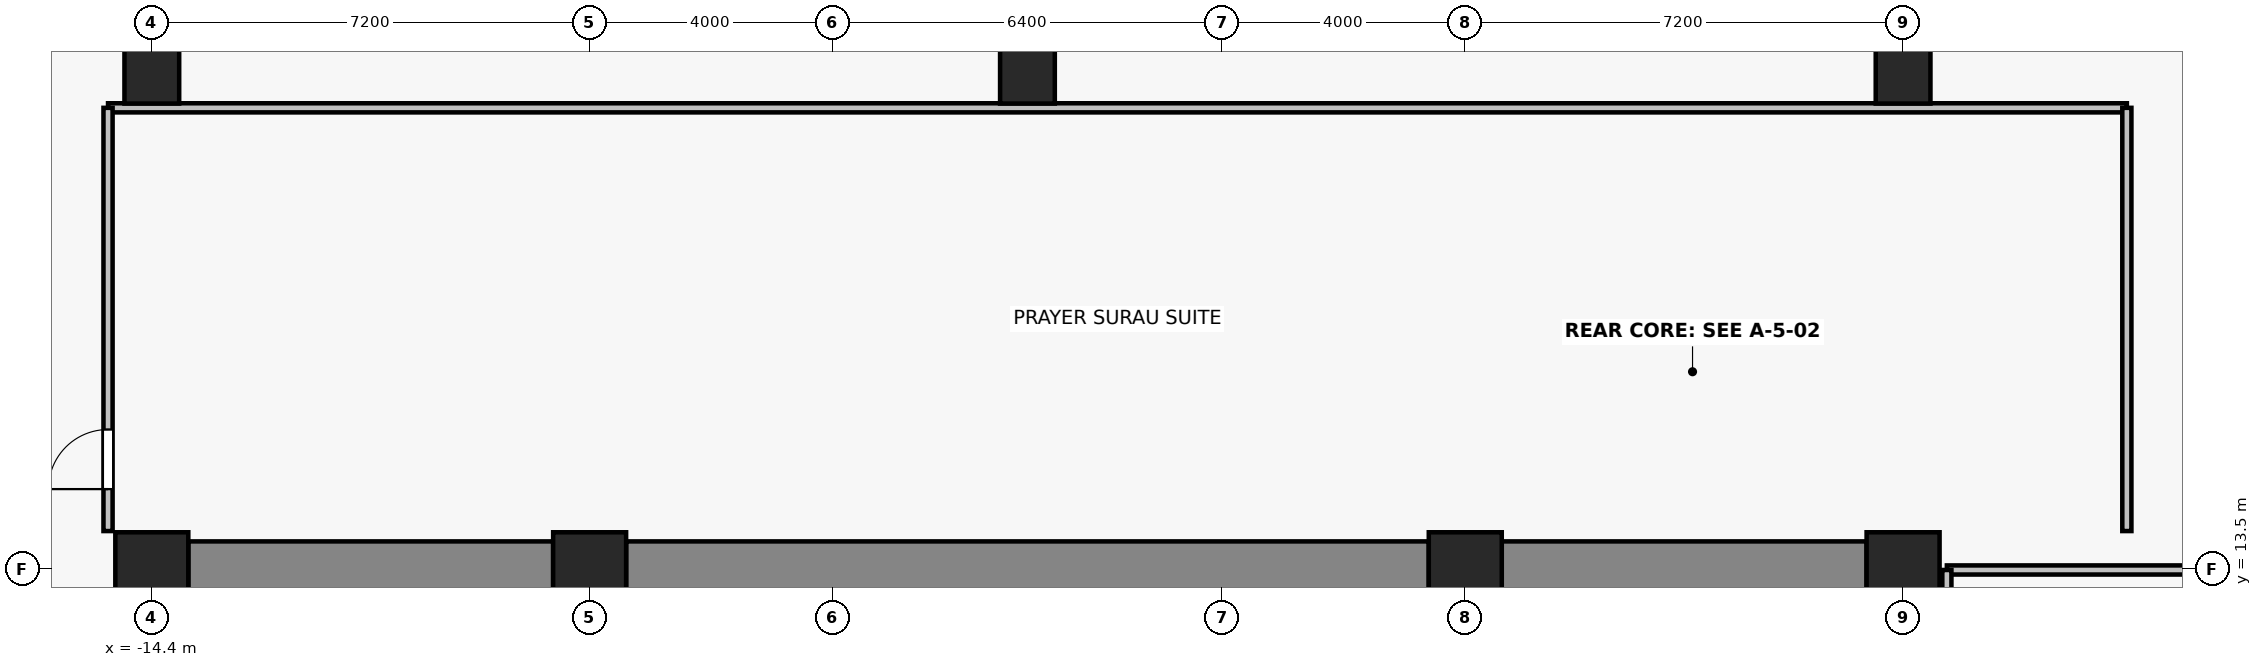
"""IFC4 building model, lengths in metres.
Left out: names, types, materials, properties, quantities, classifications, styles, units other than length and angle.
Written with IfcOpenShell. Run it as: python <this file> out.ifc"""

import sys

from ifc_helpers import new_model, si_unit, direction, frame, frame_2d, origin, origin_2d, place, context, subcontext, project, spatial, rectangle, extrude, source, transform, mapped, element, fill, save


model = new_model("IFC4")
c1 = context("Model", 3, precision=1e-05, world=origin(), true_north=direction((0.0, 1.0)))
c2 = subcontext(c1, "Body", "Model", "MODEL_VIEW")
j1 = project(units=[si_unit("LENGTHUNIT", "METRE"), si_unit("PLANEANGLEUNIT", "RADIAN")], contexts=[c1])
p1 = place(None, origin())
s1 = spatial("IfcSite", under=j1, at=p1, CompositionType="ELEMENT")
p2 = place(p1, origin())
s2 = spatial("IfcBuilding", under=s1, at=p2, CompositionType="ELEMENT")
p3 = place(p2, frame((0.0, 0.0, 22.6)))
s3 = spatial("IfcBuildingStorey", under=s2, at=p3, CompositionType="ELEMENT", Elevation=22.6)
for number, where, z_axis, x_axis in (
    (1, (-14.4, 13.5, 0.0), (0.0, 0.0, 1.0), (1.0, 0.0, 0.0)),
    (2, (-7.2, 13.5, 0.0), (0.0, 0.0, 1.0), (1.0, 0.0, 0.0)),
    (3, (7.2, 13.5, 0.0), (0.0, 0.0, 1.0), (1.0, 0.0, 0.0)),
    (4, (14.4, 13.5, 0.0), (0.0, 0.0, 1.0), (1.0, 0.0, 0.0)),
):
    element("IfcColumn", number, at=place(p3, frame(where, z_axis=z_axis, x_axis=x_axis)), inside=s3, PredefinedType="COLUMN", context=c2, shape_type="SweptSolid", body=[
        extrude(rectangle(XDim=1.2, YDim=1.2, at=origin_2d()), origin(), (0.0, 0.0, 1.0), 4.8),
    ])
for number, where, z_axis, x_axis in (
    (5, (-14.4, 21.6, 0.0), (0.0, 0.0, 1.0), (1.0, 0.0, 0.0)),
    (6, (0.0, 21.6, 0.0), (0.0, 0.0, 1.0), (1.0, 0.0, 0.0)),
    (7, (14.4, 21.6, 0.0), (0.0, 0.0, 1.0), (1.0, 0.0, 0.0)),
):
    element("IfcColumn", number, at=place(p3, frame(where, z_axis=z_axis, x_axis=x_axis)), inside=s3, PredefinedType="COLUMN", context=c2, shape_type="SweptSolid", body=[
        extrude(rectangle(XDim=0.9, YDim=0.9, at=origin_2d()), origin(), (0.0, 0.0, 1.0), 4.8),
    ])
p4 = place(p3, frame((-13.8, 13.5, 0.0), z_axis=(0.0, 0.0, 1.0), x_axis=(1.0, 0.0, 0.0)))
e8 = element("IfcWall", 8, at=p4, inside=s3, PredefinedType="SHEAR", context=c2, shape_type="SweptSolid", body=[
    extrude(rectangle(XDim=6.0, YDim=0.9, at=frame_2d((3.0, 0.0))), origin(), (0.0, 0.0, 1.0), 4.55),
])
p5 = place(p3, frame((-6.6, 13.5, 0.0), z_axis=(0.0, 0.0, 1.0), x_axis=(1.0, 0.0, 0.0)))
e9 = element("IfcWall", 9, at=p5, inside=s3, PredefinedType="SHEAR", context=c2, shape_type="SweptSolid", body=[
    extrude(rectangle(XDim=13.2, YDim=0.9, at=frame_2d((6.6, 0.0))), origin(), (0.0, 0.0, 1.0), 4.55),
])
p6 = place(p3, frame((7.8, 13.5, 0.0), z_axis=(0.0, 0.0, 1.0), x_axis=(1.0, 0.0, 0.0)))
e10 = element("IfcWall", 10, at=p6, inside=s3, PredefinedType="SHEAR", context=c2, shape_type="SweptSolid", body=[
    extrude(rectangle(XDim=6.0, YDim=0.9, at=frame_2d((3.0, 0.0))), origin(), (0.0, 0.0, 1.0), 4.55),
])
p7 = place(p3, frame((15.12, 13.48, 0.0), z_axis=(0.0, 0.0, 1.0), x_axis=(1.0, 0.0, 0.0)))
e11 = element("IfcWall", 11, at=p7, inside=s3, PredefinedType="PARTITIONING", context=c2, shape_type="SweptSolid", body=[
    extrude(rectangle(XDim=5.76, YDim=0.15, at=frame_2d((2.88, 0.0))), origin(), (0.0, 0.0, 1.0), 3.726),
])
p8 = place(p3, frame((15.12, -1.67, 0.0), z_axis=(0.0, 0.0, 1.0), x_axis=(0.0, 1.0, 0.0)))
e12 = element("IfcWall", 12, at=p8, inside=s3, PredefinedType="PARTITIONING", context=c2, shape_type="SweptSolid", body=[
    extrude(rectangle(XDim=15.15, YDim=0.15, at=frame_2d((7.575, 0.0))), origin(), (0.0, 0.0, 1.0), 3.726),
])
p9 = place(p3, frame((-15.12, 21.08, 0.0), z_axis=(0.0, 0.0, 1.0), x_axis=(1.0, 0.0, 0.0)))
e13 = element("IfcWall", 13, at=p9, inside=s3, PredefinedType="PARTITIONING", context=c2, shape_type="SweptSolid", body=[
    extrude(rectangle(XDim=33.2, YDim=0.15, at=frame_2d((16.6, 0.0))), origin(), (0.0, 0.0, 1.0), 3.09),
])
p10 = place(p3, frame((-15.12, 14.12, 0.0), z_axis=(0.0, 0.0, 1.0), x_axis=(0.0, 1.0, 0.0)))
e14 = element("IfcWall", 14, at=p10, inside=s3, PredefinedType="PARTITIONING", context=c2, shape_type="SweptSolid", body=[
    extrude(rectangle(XDim=6.96, YDim=0.15, at=frame_2d((3.48, 0.0))), origin(), (0.0, 0.0, 1.0), 3.94),
])
p11 = place(p10, frame((0.69, 0.0, 0.0)))
e15 = element("IfcOpeningElement", 15, at=p11, cuts=e14, PredefinedType="OPENING", context=c2, shape_type="SweptSolid", body=[
    extrude(rectangle(XDim=0.98, YDim=2.15, at=frame_2d((0.49, 1.075))), frame((0.0, 0.085, 0.0), z_axis=(0.0, -1.0, 0.0), x_axis=(1.0, 0.0, 0.0)), (0.0, 0.0, 1.0), 0.17),
])
p12 = place(p3, frame((18.08, 21.08, 0.0), z_axis=(0.0, 0.0, 1.0), x_axis=(0.0, -1.0, 0.0)))
e16 = element("IfcWall", 16, at=p12, inside=s3, PredefinedType="PARTITIONING", context=c2, shape_type="SweptSolid", body=[
    extrude(rectangle(XDim=6.96, YDim=0.15, at=frame_2d((3.48, 0.0))), origin(), (0.0, 0.0, 1.0), 3.94),
])
m1 = source(origin(), c2, "Body", "SweptSolid", [
    extrude(rectangle(XDim=0.98, YDim=2.15, at=frame_2d((0.49, 1.075))), frame((0.0, 0.025, 0.0), z_axis=(0.0, -1.0, 0.0), x_axis=(1.0, 0.0, 0.0)), (0.0, 0.0, 1.0), 0.05),
])
p13 = place(p11, origin())
e17 = element("IfcDoor", 17, at=p13, inside=s3, OperationType="SINGLE_SWING_LEFT", PredefinedType="DOOR", context=c2, shape_type="MappedRepresentation", body=[
    mapped(m1, transform((0.0, 0.0, 0.0), x_axis=(1.0, 0.0, 0.0), y_axis=(0.0, 1.0, 0.0), z_axis=(0.0, 0.0, 1.0), scale=1.0)),
])
fill(e15, e17)
save(model, sys.argv[1])
